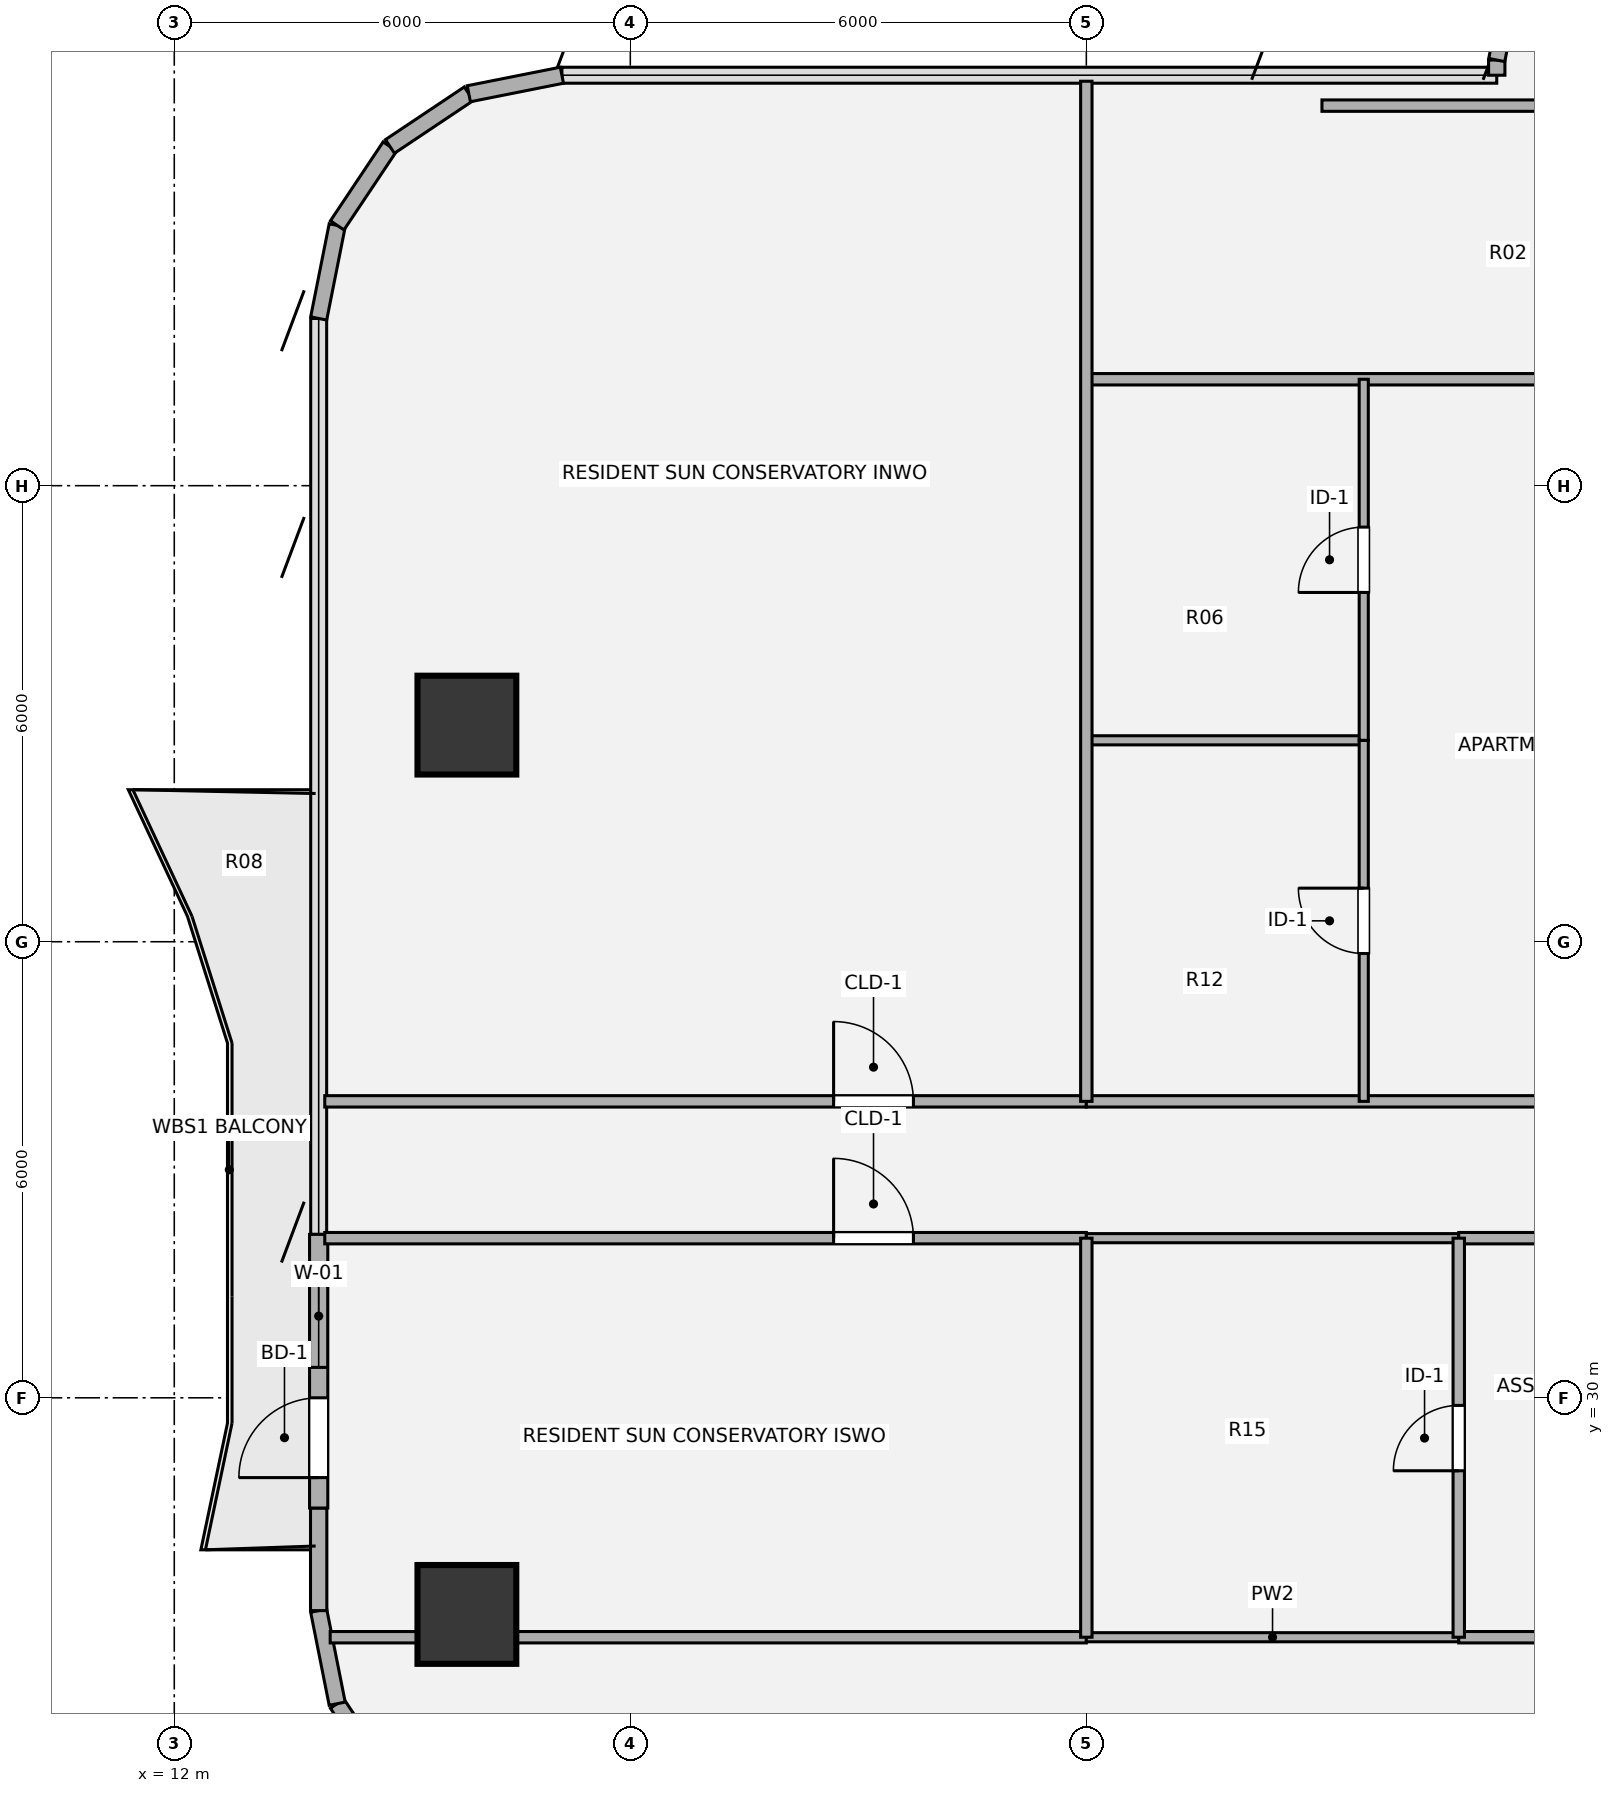
"""IFC4 building model, lengths in metres.
Left out: names, types, materials, properties, quantities, classifications, styles, units other than length and angle.
Written with IfcOpenShell. Run it as: python <this file> out.ifc"""

import sys

from ifc_helpers import new_model, si_unit, direction, frame, frame_2d, origin, origin_2d, place, context, subcontext, project, spatial, rectangle, hollow_circle, extrude, source, transform, mapped, element, fill, save


model = new_model("IFC4")
c1 = context("Model", 3, precision=1e-05, world=origin(), true_north=direction((0.0, 1.0)))
c2 = subcontext(c1, "Body", "Model", "MODEL_VIEW")
j1 = project(units=[si_unit("LENGTHUNIT", "METRE"), si_unit("PLANEANGLEUNIT", "RADIAN")], contexts=[c1])
p1 = place(None, origin())
s1 = spatial("IfcSite", under=j1, at=p1, CompositionType="ELEMENT")
p2 = place(p1, origin())
s2 = spatial("IfcBuilding", under=s1, at=p2, CompositionType="ELEMENT")
p3 = place(p2, frame((0.0, 0.0, 97.38)))
s3 = spatial("IfcBuildingStorey", under=s2, at=p3, CompositionType="ELEMENT", Elevation=97.38)
m1 = source(origin(), c2, "Body", "SweptSolid", [
    extrude(hollow_circle(Radius=0.65, WallThickness=0.045, at=origin_2d()), origin(), (0.0, 0.0, 1.0), 3.78),
])
for number, where, z_axis, x_axis in (
    (1, (15.85, 27.15, 0.0), (0.0, 0.0, 1.0), (1.0, 0.0, 0.0)),
    (2, (15.85, 38.85, 0.0), (0.0, 0.0, 1.0), (1.0, 0.0, 0.0)),
):
    element("IfcColumn", number, at=place(p3, frame(where, z_axis=z_axis, x_axis=x_axis)), inside=s3, PredefinedType="COLUMN", context=c2, shape_type="MappedRepresentation", body=[
        mapped(m1, transform((0.0, 0.0, 0.0), x_axis=(1.0, 0.0, 0.0), y_axis=(0.0, 1.0, 0.0), z_axis=(0.0, 0.0, 1.0), scale=1.0)),
    ])
for number, where, z_axis, x_axis in (
    (3, (14.837, 24.937, 0.0), (0.0, 0.0, 1.0), (-0.556, 0.831, 0.0)),
    (4, (14.144, 25.975, 0.0), (0.0, 0.0, 1.0), (-0.195, 0.981, 0.0)),
):
    element("IfcWall", number, at=place(p3, frame(where, z_axis=z_axis, x_axis=x_axis)), inside=s3, PredefinedType="SOLIDWALL", context=c2, shape_type="SweptSolid", body=[
        extrude(rectangle(XDim=1.249, YDim=0.215, at=frame_2d((0.624, 0.0))), origin(), (0.0, 0.0, 1.0), 3.53),
    ])
p4 = place(p3, frame((13.9, 27.2, 0.0), z_axis=(0.0, 0.0, 1.0), x_axis=(0.0, 1.0, 0.0)))
e5 = element("IfcWall", 5, at=p4, inside=s3, PredefinedType="SOLIDWALL", context=c2, shape_type="SweptSolid", body=[
    extrude(rectangle(XDim=1.35, YDim=0.215, at=frame_2d((0.675, 0.0))), origin(), (0.0, 0.0, 1.0), 3.53),
])
p5 = place(p3, frame((13.9, 28.55, 0.0), z_axis=(0.0, 0.0, 1.0), x_axis=(0.0, 1.0, 0.0)))
e6 = element("IfcWall", 6, at=p5, inside=s3, PredefinedType="SOLIDWALL", context=c2, shape_type="SweptSolid", body=[
    extrude(rectangle(XDim=3.6, YDim=0.24, at=frame_2d((1.8, 0.0))), origin(), (0.0, 0.0, 1.0), 3.53),
])
p6 = place(p5, frame((0.4, 0.0, 0.0)))
e7 = element("IfcOpeningElement", 7, at=p6, cuts=e6, PredefinedType="OPENING", context=c2, shape_type="SweptSolid", body=[
    extrude(rectangle(XDim=1.05, YDim=2.15, at=origin_2d()), frame((0.525, 0.13, 1.075), z_axis=(0.0, -1.0, 0.0), x_axis=(1.0, 0.0, 0.0)), (0.0, 0.0, 1.0), 0.26),
])
p7 = place(p5, frame((1.85, 0.0, 0.85)))
e8 = element("IfcOpeningElement", 8, at=p7, cuts=e6, PredefinedType="OPENING", context=c2, shape_type="SweptSolid", body=[
    extrude(rectangle(XDim=1.35, YDim=1.35, at=origin_2d()), frame((0.675, 0.13, 0.675), z_axis=(0.0, -1.0, 0.0), x_axis=(1.0, 0.0, 0.0)), (0.0, 0.0, 1.0), 0.26),
])
for number, where, z_axis, x_axis in (
    (9, (13.9, 44.2, 0.0), (0.0, 0.0, 1.0), (0.195, 0.981, 0.0)),
    (10, (14.144, 45.425, 0.0), (0.0, 0.0, 1.0), (0.556, 0.831, 0.0)),
    (11, (14.837, 46.463, 0.0), (0.0, 0.0, 1.0), (0.831, 0.556, 0.0)),
    (12, (15.875, 47.156, 0.0), (0.0, 0.0, 1.0), (0.981, 0.195, 0.0)),
):
    element("IfcWall", number, at=place(p3, frame(where, z_axis=z_axis, x_axis=x_axis)), inside=s3, PredefinedType="SOLIDWALL", context=c2, shape_type="SweptSolid", body=[
        extrude(rectangle(XDim=1.249, YDim=0.215, at=frame_2d((0.624, 0.0))), origin(), (0.0, 0.0, 1.0), 3.53),
    ])
p8 = place(p3, frame((29.4, 47.4, 0.0), z_axis=(0.0, 0.0, 1.0), x_axis=(0.0, 1.0, 0.0)))
e13 = element("IfcWall", 13, at=p8, inside=s3, PredefinedType="SOLIDWALL", context=c2, shape_type="SweptSolid", body=[
    extrude(rectangle(XDim=0.2, YDim=0.215, at=frame_2d((0.1, 0.0))), origin(), (0.0, 0.0, 1.0), 3.53),
])
p9 = place(p3, frame((29.4, 47.6, 0.0), z_axis=(0.0, 0.0, 1.0), x_axis=(0.195127417394, 0.980777900945, 0.0)))
e14 = element("IfcWall", 14, at=p9, inside=s3, PredefinedType="SOLIDWALL", context=c2, shape_type="SweptSolid", body=[
    extrude(rectangle(XDim=1.092, YDim=0.215, at=frame_2d((0.546, 0.0))), origin(), (0.0, 0.0, 1.0), 3.53),
])
p10 = place(p3, frame((14.051, 26.85, 0.0), z_axis=(0.0, 0.0, 1.0), x_axis=(1.0, 0.0, 0.0)))
e15 = element("IfcWall", 15, at=p10, inside=s3, PredefinedType="PARTITIONING", context=c2, shape_type="SweptSolid", body=[
    extrude(rectangle(XDim=9.949, YDim=0.15, at=frame_2d((4.974, 0.0))), origin(), (0.0, 0.0, 1.0), 3.055),
])
p11 = place(p3, frame((24.0, 26.85, 0.0), z_axis=(0.0, 0.0, 1.0), x_axis=(1.0, 0.0, 0.0)))
e16 = element("IfcWall", 16, at=p11, inside=s3, PredefinedType="PARTITIONING", context=c2, shape_type="SweptSolid", body=[
    extrude(rectangle(XDim=4.9, YDim=0.12, at=frame_2d((2.45, 0.0))), origin(), (0.0, 0.0, 1.0), 3.055),
])
p12 = place(p3, frame((28.9, 26.85, 0.0), z_axis=(0.0, 0.0, 1.0), x_axis=(1.0, 0.0, 0.0)))
e17 = element("IfcWall", 17, at=p12, inside=s3, PredefinedType="PARTITIONING", context=c2, shape_type="SweptSolid", body=[
    extrude(rectangle(XDim=6.2, YDim=0.15, at=frame_2d((3.1, 0.0))), origin(), (0.0, 0.0, 1.0), 2.903),
])
p13 = place(p3, frame((13.98, 32.1, 0.0), z_axis=(0.0, 0.0, 1.0), x_axis=(1.0, 0.0, 0.0)))
e18 = element("IfcWall", 18, at=p13, inside=s3, PredefinedType="PARTITIONING", context=c2, shape_type="SweptSolid", body=[
    extrude(rectangle(XDim=10.02, YDim=0.15, at=frame_2d((5.01, 0.0))), origin(), (0.0, 0.0, 1.0), 2.982),
])
p14 = place(p13, frame((6.695, 0.0, 0.0)))
e19 = element("IfcOpeningElement", 19, at=p14, cuts=e18, PredefinedType="OPENING", context=c2, shape_type="SweptSolid", body=[
    extrude(rectangle(XDim=1.05, YDim=2.1, at=origin_2d()), frame((0.525, 0.085, 1.05), z_axis=(0.0, -1.0, 0.0), x_axis=(1.0, 0.0, 0.0)), (0.0, 0.0, 1.0), 0.17),
])
p15 = place(p3, frame((24.0, 32.1, 0.0), z_axis=(0.0, 0.0, 1.0), x_axis=(1.0, 0.0, 0.0)))
e20 = element("IfcWall", 20, at=p15, inside=s3, PredefinedType="PARTITIONING", context=c2, shape_type="SweptSolid", body=[
    extrude(rectangle(XDim=4.9, YDim=0.12, at=frame_2d((2.45, 0.0))), origin(), (0.0, 0.0, 1.0), 2.982),
])
p16 = place(p3, frame((28.9, 32.1, 0.0), z_axis=(0.0, 0.0, 1.0), x_axis=(1.0, 0.0, 0.0)))
e21 = element("IfcWall", 21, at=p16, inside=s3, PredefinedType="PARTITIONING", context=c2, shape_type="SweptSolid", body=[
    extrude(rectangle(XDim=6.2, YDim=0.15, at=frame_2d((3.1, 0.0))), origin(), (0.0, 0.0, 1.0), 2.982),
])
p17 = place(p3, frame((13.98, 33.9, 0.0), z_axis=(0.0, 0.0, 1.0), x_axis=(1.0, 0.0, 0.0)))
e22 = element("IfcWall", 22, at=p17, inside=s3, PredefinedType="PARTITIONING", context=c2, shape_type="SweptSolid", body=[
    extrude(rectangle(XDim=10.02, YDim=0.15, at=frame_2d((5.01, 0.0))), origin(), (0.0, 0.0, 1.0), 2.982),
])
p18 = place(p17, frame((6.695, 0.0, 0.0)))
e23 = element("IfcOpeningElement", 23, at=p18, cuts=e22, PredefinedType="OPENING", context=c2, shape_type="SweptSolid", body=[
    extrude(rectangle(XDim=1.05, YDim=2.1, at=origin_2d()), frame((0.525, 0.085, 1.05), z_axis=(0.0, -1.0, 0.0), x_axis=(1.0, 0.0, 0.0)), (0.0, 0.0, 1.0), 0.17),
])
p19 = place(p3, frame((24.0, 33.9, 0.0), z_axis=(0.0, 0.0, 1.0), x_axis=(1.0, 0.0, 0.0)))
e24 = element("IfcWall", 24, at=p19, inside=s3, PredefinedType="PARTITIONING", context=c2, shape_type="SweptSolid", body=[
    extrude(rectangle(XDim=11.1, YDim=0.15, at=frame_2d((5.55, 0.0))), origin(), (0.0, 0.0, 1.0), 2.982),
])
p20 = place(p3, frame((24.0, 38.65, 0.0), z_axis=(0.0, 0.0, 1.0), x_axis=(1.0, 0.0, 0.0)))
e25 = element("IfcWall", 25, at=p20, inside=s3, PredefinedType="PARTITIONING", context=c2, shape_type="SweptSolid", body=[
    extrude(rectangle(XDim=3.65, YDim=0.12, at=frame_2d((1.825, 0.0))), origin(), (0.0, 0.0, 1.0), 2.903),
])
p21 = place(p3, frame((24.0, 43.4, 0.0), z_axis=(0.0, 0.0, 1.0), x_axis=(1.0, 0.0, 0.0)))
e26 = element("IfcWall", 26, at=p21, inside=s3, PredefinedType="PARTITIONING", context=c2, shape_type="SweptSolid", body=[
    extrude(rectangle(XDim=11.1, YDim=0.15, at=frame_2d((5.55, 0.0))), origin(), (0.0, 0.0, 1.0), 3.308),
])
p22 = place(p3, frame((27.1, 47.0, 0.0), z_axis=(0.0, 0.0, 1.0), x_axis=(1.0, 0.0, 0.0)))
e27 = element("IfcWall", 27, at=p22, inside=s3, PredefinedType="PARTITIONING", context=c2, shape_type="SweptSolid", body=[
    extrude(rectangle(XDim=17.8, YDim=0.15, at=frame_2d((8.9, 0.0))), origin(), (0.0, 0.0, 1.0), 3.308),
])
p23 = place(p22, frame((8.375, 0.0, 0.0)))
e28 = element("IfcOpeningElement", 28, at=p23, cuts=e27, PredefinedType="OPENING", context=c2, shape_type="SweptSolid", body=[
    extrude(rectangle(XDim=1.05, YDim=2.1, at=origin_2d()), frame((0.525, 0.085, 1.05), z_axis=(0.0, -1.0, 0.0), x_axis=(1.0, 0.0, 0.0)), (0.0, 0.0, 1.0), 0.17),
])
p24 = place(p3, frame((24.0, 26.85, 0.0), z_axis=(0.0, 0.0, 1.0), x_axis=(0.0, 1.0, 0.0)))
e29 = element("IfcWall", 29, at=p24, inside=s3, PredefinedType="PARTITIONING", context=c2, shape_type="SweptSolid", body=[
    extrude(rectangle(XDim=5.25, YDim=0.15, at=frame_2d((2.625, 0.0))), origin(), (0.0, 0.0, 1.0), 3.5),
])
p25 = place(p3, frame((24.0, 33.9, 0.0), z_axis=(0.0, 0.0, 1.0), x_axis=(0.0, 1.0, 0.0)))
e30 = element("IfcWall", 30, at=p25, inside=s3, PredefinedType="PARTITIONING", context=c2, shape_type="SweptSolid", body=[
    extrude(rectangle(XDim=13.421, YDim=0.15, at=frame_2d((6.71, 0.0))), origin(), (0.0, 0.0, 1.0), 3.5),
])
p26 = place(p3, frame((27.65, 33.9, 0.0), z_axis=(0.0, 0.0, 1.0), x_axis=(0.0, 1.0, 0.0)))
e31 = element("IfcWall", 31, at=p26, inside=s3, PredefinedType="PARTITIONING", context=c2, shape_type="SweptSolid", body=[
    extrude(rectangle(XDim=4.75, YDim=0.12, at=frame_2d((2.375, 0.0))), origin(), (0.0, 0.0, 1.0), 3.5),
])
p27 = place(p26, frame((1.945, 0.0, 0.0)))
e32 = element("IfcOpeningElement", 32, at=p27, cuts=e31, PredefinedType="OPENING", context=c2, shape_type="SweptSolid", body=[
    extrude(rectangle(XDim=0.86, YDim=2.1, at=origin_2d()), frame((0.43, 0.07, 1.05), z_axis=(0.0, -1.0, 0.0), x_axis=(1.0, 0.0, 0.0)), (0.0, 0.0, 1.0), 0.14),
])
p28 = place(p3, frame((27.65, 38.65, 0.0), z_axis=(0.0, 0.0, 1.0), x_axis=(0.0, 1.0, 0.0)))
e33 = element("IfcWall", 33, at=p28, inside=s3, PredefinedType="PARTITIONING", context=c2, shape_type="SweptSolid", body=[
    extrude(rectangle(XDim=4.75, YDim=0.12, at=frame_2d((2.375, 0.0))), origin(), (0.0, 0.0, 1.0), 3.5),
])
p29 = place(p28, frame((1.945, 0.0, 0.0)))
e34 = element("IfcOpeningElement", 34, at=p29, cuts=e33, PredefinedType="OPENING", context=c2, shape_type="SweptSolid", body=[
    extrude(rectangle(XDim=0.86, YDim=2.1, at=origin_2d()), frame((0.43, 0.07, 1.05), z_axis=(0.0, -1.0, 0.0), x_axis=(1.0, 0.0, 0.0)), (0.0, 0.0, 1.0), 0.14),
])
p30 = place(p3, frame((28.9, 26.85, 0.0), z_axis=(0.0, 0.0, 1.0), x_axis=(0.0, 1.0, 0.0)))
e35 = element("IfcWall", 35, at=p30, inside=s3, PredefinedType="PARTITIONING", context=c2, shape_type="SweptSolid", body=[
    extrude(rectangle(XDim=5.25, YDim=0.15, at=frame_2d((2.625, 0.0))), origin(), (0.0, 0.0, 1.0), 3.5),
])
p31 = place(p30, frame((2.19, 0.0, 0.0)))
e36 = element("IfcOpeningElement", 36, at=p31, cuts=e35, PredefinedType="OPENING", context=c2, shape_type="SweptSolid", body=[
    extrude(rectangle(XDim=0.86, YDim=2.1, at=origin_2d()), frame((0.43, 0.085, 1.05), z_axis=(0.0, -1.0, 0.0), x_axis=(1.0, 0.0, 0.0)), (0.0, 0.0, 1.0), 0.17),
])
m2 = source(origin(), c2, "Body", "SweptSolid", [
    extrude(rectangle(XDim=1.05, YDim=2.15, at=origin_2d()), frame((0.525, 0.025, 1.075), z_axis=(0.0, -1.0, 0.0), x_axis=(1.0, 0.0, 0.0)), (0.0, 0.0, 1.0), 0.05),
])
p32 = place(p6, origin())
e37 = element("IfcDoor", 37, at=p32, inside=s3, OperationType="SINGLE_SWING_LEFT", PredefinedType="DOOR", context=c2, shape_type="MappedRepresentation", body=[
    mapped(m2, transform((0.0, 0.0, 0.0), x_axis=(1.0, 0.0, 0.0), y_axis=(0.0, 1.0, 0.0), z_axis=(0.0, 0.0, 1.0), scale=1.0)),
])
fill(e7, e37)
m3 = source(origin(), c2, "Body", "SweptSolid", [
    extrude(rectangle(XDim=1.35, YDim=1.35, at=origin_2d()), frame((0.675, 0.03, 0.675), z_axis=(0.0, -1.0, 0.0), x_axis=(1.0, 0.0, 0.0)), (0.0, 0.0, 1.0), 0.06),
])
p33 = place(p7, origin())
e38 = element("IfcWindow", 38, at=p33, inside=s3, PartitioningType="SINGLE_PANEL", PredefinedType="WINDOW", context=c2, shape_type="MappedRepresentation", body=[
    mapped(m3, transform((0.0, 0.0, 0.0), x_axis=(1.0, 0.0, 0.0), y_axis=(0.0, 1.0, 0.0), z_axis=(0.0, 0.0, 1.0), scale=1.0)),
])
fill(e8, e38)
m4 = source(origin(), c2, "Body", "SweptSolid", [
    extrude(rectangle(XDim=1.05, YDim=2.1, at=origin_2d()), frame((0.525, 0.025, 1.05), z_axis=(0.0, -1.0, 0.0), x_axis=(1.0, 0.0, 0.0)), (0.0, 0.0, 1.0), 0.05),
])
p34 = place(p14, origin())
e39 = element("IfcDoor", 39, at=p34, inside=s3, OperationType="SINGLE_SWING_LEFT", PredefinedType="DOOR", context=c2, shape_type="MappedRepresentation", body=[
    mapped(m4, transform((0.0, 0.0, 0.0), x_axis=(1.0, 0.0, 0.0), y_axis=(0.0, 1.0, 0.0), z_axis=(0.0, 0.0, 1.0), scale=1.0)),
])
fill(e19, e39)
p35 = place(p18, origin())
e40 = element("IfcDoor", 40, at=p35, inside=s3, OperationType="SINGLE_SWING_LEFT", PredefinedType="DOOR", context=c2, shape_type="MappedRepresentation", body=[
    mapped(m4, transform((0.0, 0.0, 0.0), x_axis=(1.0, 0.0, 0.0), y_axis=(0.0, 1.0, 0.0), z_axis=(0.0, 0.0, 1.0), scale=1.0)),
])
fill(e23, e40)
m5 = source(origin(), c2, "Body", "SweptSolid", [
    extrude(rectangle(XDim=0.86, YDim=2.1, at=origin_2d()), frame((0.43, 0.025, 1.05), z_axis=(0.0, -1.0, 0.0), x_axis=(1.0, 0.0, 0.0)), (0.0, 0.0, 1.0), 0.05),
])
p36 = place(p27, origin())
e41 = element("IfcDoor", 41, at=p36, inside=s3, OperationType="SINGLE_SWING_RIGHT", PredefinedType="DOOR", context=c2, shape_type="MappedRepresentation", body=[
    mapped(m5, transform((0.0, 0.0, 0.0), x_axis=(1.0, 0.0, 0.0), y_axis=(0.0, 1.0, 0.0), z_axis=(0.0, 0.0, 1.0), scale=1.0)),
])
fill(e32, e41)
p37 = place(p29, origin())
e42 = element("IfcDoor", 42, at=p37, inside=s3, OperationType="SINGLE_SWING_LEFT", PredefinedType="DOOR", context=c2, shape_type="MappedRepresentation", body=[
    mapped(m5, transform((0.0, 0.0, 0.0), x_axis=(1.0, 0.0, 0.0), y_axis=(0.0, 1.0, 0.0), z_axis=(0.0, 0.0, 1.0), scale=1.0)),
])
fill(e34, e42)
p38 = place(p31, origin())
e43 = element("IfcDoor", 43, at=p38, inside=s3, OperationType="SINGLE_SWING_LEFT", PredefinedType="DOOR", context=c2, shape_type="MappedRepresentation", body=[
    mapped(m5, transform((0.0, 0.0, 0.0), x_axis=(1.0, 0.0, 0.0), y_axis=(0.0, 1.0, 0.0), z_axis=(0.0, 0.0, 1.0), scale=1.0)),
])
fill(e36, e43)
save(model, sys.argv[1])
